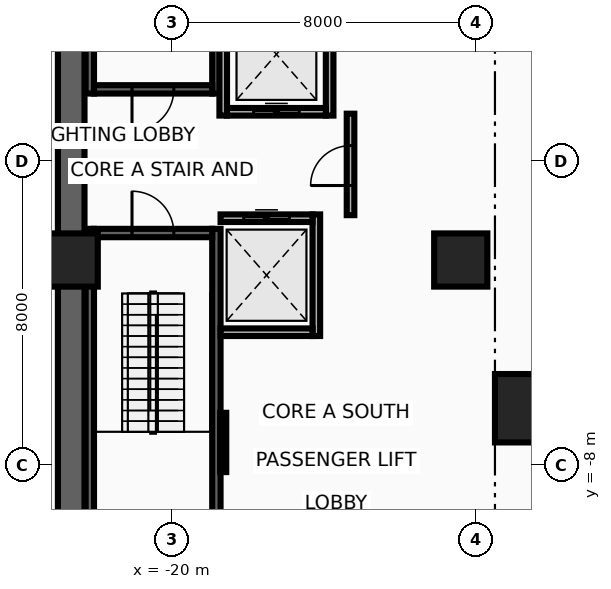
"""IFC4 building model, lengths in metres.
Left out: names, types, materials, properties, quantities, classifications, styles, units other than length and angle.
Written with IfcOpenShell. Run it as: python <this file> out.ifc"""

import sys

from ifc_helpers import new_model, si_unit, direction, frame, frame_2d, origin, origin_2d, place, context, subcontext, project, spatial, rectangle, extrude, source, transform, mapped, element, fill, save


model = new_model("IFC4")
c1 = context("Model", 3, precision=1e-05, world=origin(), true_north=direction((0.0, 1.0)))
c2 = subcontext(c1, "Body", "Model", "MODEL_VIEW")
j1 = project(units=[si_unit("LENGTHUNIT", "METRE"), si_unit("PLANEANGLEUNIT", "RADIAN")], contexts=[c1])
p1 = place(None, origin())
s1 = spatial("IfcSite", under=j1, at=p1, CompositionType="ELEMENT")
p2 = place(p1, origin())
s2 = spatial("IfcBuilding", under=s1, at=p2, CompositionType="ELEMENT")
p3 = place(p2, frame((0.0, 0.0, -9.6)))
s3 = spatial("IfcBuildingStorey", under=s2, at=p3, CompositionType="ELEMENT", Elevation=-9.6)
for number, where, z_axis, x_axis in (
    (1, (-22.16, 1.78, 0.0), (0.0, 0.0, 1.0), (0.0, 1.0, 0.0)),
    (2, (-18.83, 1.78, 0.0), (0.0, 0.0, 1.0), (0.0, 1.0, 0.0)),
):
    element("IfcWall", number, at=place(p3, frame(where, z_axis=z_axis, x_axis=x_axis)), inside=s3, PredefinedType="SHEAR", context=c2, shape_type="SweptSolid", body=[
        extrude(rectangle(XDim=8.67, YDim=0.22, at=frame_2d((4.335, 0.0))), origin(), (0.0, 0.0, 1.0), 4.54),
    ])
p4 = place(p3, frame((-22.05, 1.89, 0.0), z_axis=(0.0, 0.0, 1.0), x_axis=(1.0, 0.0, 0.0)))
e3 = element("IfcWall", 3, at=p4, inside=s3, PredefinedType="SHEAR", context=c2, shape_type="SweptSolid", body=[
    extrude(rectangle(XDim=3.11, YDim=0.22, at=frame_2d((1.555, 0.0))), origin(), (0.0, 0.0, 1.0), 4.54),
])
p5 = place(p4, frame((1.0, 0.0, 0.0)))
e4 = element("IfcOpeningElement", 4, at=p5, cuts=e3, PredefinedType="OPENING", context=c2, shape_type="SweptSolid", body=[
    extrude(rectangle(XDim=1.1, YDim=2.15, at=frame_2d((0.55, 1.075))), frame((0.0, 0.125, 0.0), z_axis=(0.0, -1.0, 0.0), x_axis=(1.0, 0.0, 0.0)), (0.0, 0.0, 1.0), 0.25),
])
for number, where, z_axis, x_axis in (
    (5, (-22.16, -10.45, 0.0), (0.0, 0.0, 1.0), (0.0, 1.0, 0.0)),
    (6, (-18.83, -10.45, 0.0), (0.0, 0.0, 1.0), (0.0, 1.0, 0.0)),
):
    element("IfcWall", number, at=place(p3, frame(where, z_axis=z_axis, x_axis=x_axis)), inside=s3, PredefinedType="SHEAR", context=c2, shape_type="SweptSolid", body=[
        extrude(rectangle(XDim=8.67, YDim=0.22, at=frame_2d((4.335, 0.0))), origin(), (0.0, 0.0, 1.0), 4.54),
    ])
p6 = place(p3, frame((-22.05, -1.89, 0.0), z_axis=(0.0, 0.0, 1.0), x_axis=(1.0, 0.0, 0.0)))
e7 = element("IfcWall", 7, at=p6, inside=s3, PredefinedType="SHEAR", context=c2, shape_type="SweptSolid", body=[
    extrude(rectangle(XDim=3.11, YDim=0.22, at=frame_2d((1.555, 0.0))), origin(), (0.0, 0.0, 1.0), 4.54),
])
p7 = place(p6, frame((1.0, 0.0, 0.0)))
e8 = element("IfcOpeningElement", 8, at=p7, cuts=e7, PredefinedType="OPENING", context=c2, shape_type="SweptSolid", body=[
    extrude(rectangle(XDim=1.1, YDim=2.15, at=frame_2d((0.55, 1.075))), frame((0.0, 0.125, 0.0), z_axis=(0.0, -1.0, 0.0), x_axis=(1.0, 0.0, 0.0)), (0.0, 0.0, 1.0), 0.25),
])
p8 = place(p3, frame((-22.65, -11.15, 0.0), z_axis=(0.0, 0.0, 1.0), x_axis=(0.0, 1.0, 0.0)))
e9 = element("IfcWall", 9, at=p8, inside=s3, PredefinedType="SHEAR", context=c2, shape_type="SweptSolid", body=[
    extrude(rectangle(XDim=22.3, YDim=0.7, at=frame_2d((11.15, 0.0))), origin(), (0.0, 0.0, 1.0), 4.54),
])
m1 = source(origin(), c2, "Body", "SweptSolid", [
    extrude(rectangle(XDim=1.4, YDim=1.4, at=origin_2d()), origin(), (0.0, 0.0, 1.0), 4.8),
])
for number, where, z_axis, x_axis in (
    (10, (-22.65, -2.6, 0.0), (0.0, 0.0, 1.0), (1.0, 0.0, 0.0)),
    (11, (-12.4, -2.6, 0.0), (0.0, 0.0, 1.0), (1.0, 0.0, 0.0)),
):
    element("IfcColumn", number, at=place(p3, frame(where, z_axis=z_axis, x_axis=x_axis)), inside=s3, PredefinedType="COLUMN", context=c2, shape_type="MappedRepresentation", body=[
        mapped(m1, transform((0.0, 0.0, 0.0), x_axis=(1.0, 0.0, 0.0), y_axis=(0.0, 1.0, 0.0), z_axis=(0.0, 0.0, 1.0), scale=1.0)),
    ])
m2 = source(origin(), c2, "Body", "SweptSolid", [
    extrude(rectangle(XDim=1.8, YDim=1.8, at=origin_2d()), origin(), (0.0, 0.0, 1.0), 4.8),
])
p9 = place(p3, frame((-10.6, -6.5, 0.0), z_axis=(0.0, 0.0, 1.0), x_axis=(1.0, 0.0, 0.0)))
e12 = element("IfcColumn", 12, at=p9, inside=s3, PredefinedType="COLUMN", context=c2, shape_type="MappedRepresentation", body=[
    mapped(m2, transform((0.0, 0.0, 0.0), x_axis=(1.0, 0.0, 0.0), y_axis=(0.0, 1.0, 0.0), z_axis=(0.0, 0.0, 1.0), scale=1.0)),
])
for number, where, z_axis, x_axis in (
    (13, (-18.65, 1.2, 0.0), (0.0, 0.0, 1.0), (0.0, 1.0, 0.0)),
    (14, (-15.85, 1.2, 0.0), (0.0, 0.0, 1.0), (0.0, 1.0, 0.0)),
):
    element("IfcWall", number, at=place(p3, frame(where, z_axis=z_axis, x_axis=x_axis)), inside=s3, PredefinedType="MOVABLE", context=c2, shape_type="SweptSolid", body=[
        extrude(rectangle(XDim=3.225, YDim=0.2, at=frame_2d((1.613, 0.0))), origin(), (0.0, 0.0, 1.0), 4.54),
    ])
p10 = place(p3, frame((-18.55, 1.3, 0.0), z_axis=(0.0, 0.0, 1.0), x_axis=(1.0, 0.0, 0.0)))
e15 = element("IfcWall", 15, at=p10, inside=s3, PredefinedType="MOVABLE", context=c2, shape_type="SweptSolid", body=[
    extrude(rectangle(XDim=2.6, YDim=0.2, at=frame_2d((1.3, 0.0))), origin(), (0.0, 0.0, 1.0), 4.54),
])
p11 = place(p10, frame((0.7, 0.0, 0.0)))
e16 = element("IfcOpeningElement", 16, at=p11, cuts=e15, PredefinedType="OPENING", context=c2, shape_type="SweptSolid", body=[
    extrude(rectangle(XDim=1.2, YDim=2.1, at=frame_2d((0.6, 1.05))), frame((0.0, 0.115, 0.0), z_axis=(0.0, -1.0, 0.0), x_axis=(1.0, 0.0, 0.0)), (0.0, 0.0, 1.0), 0.23),
])
p12 = place(p3, frame((-16.2, -4.6, 0.0), z_axis=(0.0, 0.0, 1.0), x_axis=(0.0, 1.0, 0.0)))
e17 = element("IfcWall", 17, at=p12, inside=s3, PredefinedType="MOVABLE", context=c2, shape_type="SweptSolid", body=[
    extrude(rectangle(XDim=3.2, YDim=0.2, at=frame_2d((1.6, 0.0))), origin(), (0.0, 0.0, 1.0), 4.54),
])
p13 = place(p3, frame((-18.72, -4.5, 0.0), z_axis=(0.0, 0.0, 1.0), x_axis=(1.0, 0.0, 0.0)))
e18 = element("IfcWall", 18, at=p13, inside=s3, PredefinedType="MOVABLE", context=c2, shape_type="SweptSolid", body=[
    extrude(rectangle(XDim=2.42, YDim=0.2, at=frame_2d((1.21, 0.0))), origin(), (0.0, 0.0, 1.0), 4.54),
])
p14 = place(p3, frame((-18.72, -1.5, 0.0), z_axis=(0.0, 0.0, 1.0), x_axis=(1.0, 0.0, 0.0)))
e19 = element("IfcWall", 19, at=p14, inside=s3, PredefinedType="MOVABLE", context=c2, shape_type="SweptSolid", body=[
    extrude(rectangle(XDim=2.42, YDim=0.2, at=frame_2d((1.21, 0.0))), origin(), (0.0, 0.0, 1.0), 4.54),
])
p15 = place(p14, frame((0.61, 0.0, 0.0)))
e20 = element("IfcOpeningElement", 20, at=p15, cuts=e19, PredefinedType="OPENING", context=c2, shape_type="SweptSolid", body=[
    extrude(rectangle(XDim=1.2, YDim=2.1, at=frame_2d((0.6, 1.05))), frame((0.0, 0.115, 0.0), z_axis=(0.0, -1.0, 0.0), x_axis=(1.0, 0.0, 0.0)), (0.0, 0.0, 1.0), 0.23),
])
p16 = place(p3, frame((-15.3, -1.42, 0.0), z_axis=(0.0, 0.0, 1.0), x_axis=(0.0, 1.0, 0.0)))
e21 = element("IfcWall", 21, at=p16, inside=s3, PredefinedType="PARTITIONING", context=c2, shape_type="SweptSolid", body=[
    extrude(rectangle(XDim=2.67, YDim=0.2, at=frame_2d((1.335, 0.0))), origin(), (0.0, 0.0, 1.0), 4.54),
])
p17 = place(p16, frame((0.78, 0.0, 0.0)))
e22 = element("IfcOpeningElement", 22, at=p17, cuts=e21, PredefinedType="OPENING", context=c2, shape_type="SweptSolid", body=[
    extrude(rectangle(XDim=1.05, YDim=2.15, at=frame_2d((0.525, 1.075))), frame((0.0, 0.115, 0.0), z_axis=(0.0, -1.0, 0.0), x_axis=(1.0, 0.0, 0.0)), (0.0, 0.0, 1.0), 0.23),
])
p18 = place(p3, frame((-18.65, -8.18, 0.0), z_axis=(0.0, 0.0, 1.0), x_axis=(0.0, 1.0, 0.0)))
e23 = element("IfcWall", 23, at=p18, inside=s3, PredefinedType="PARTITIONING", context=c2, shape_type="SweptSolid", body=[
    extrude(rectangle(XDim=1.56, YDim=0.16, at=frame_2d((0.78, 0.0))), origin(), (0.0, 0.0, 1.0), 4.54),
])
p19 = place(p11, origin())
e24 = element("IfcDoor", 24, at=p19, inside=s3, OperationType="DOUBLE_DOOR_SLIDING", PredefinedType="DOOR", context=c2, shape_type="SweptSolid", body=[
    extrude(rectangle(XDim=1.2, YDim=2.1, at=frame_2d((0.6, 1.05))), frame((0.0, 0.025, 0.0), z_axis=(0.0, -1.0, 0.0), x_axis=(1.0, 0.0, 0.0)), (0.0, 0.0, 1.0), 0.05),
])
fill(e16, e24)
p20 = place(p15, origin())
e25 = element("IfcDoor", 25, at=p20, inside=s3, OperationType="DOUBLE_DOOR_SLIDING", PredefinedType="DOOR", context=c2, shape_type="SweptSolid", body=[
    extrude(rectangle(XDim=1.2, YDim=2.1, at=frame_2d((0.6, 1.05))), frame((0.0, 0.025, 0.0), z_axis=(0.0, -1.0, 0.0), x_axis=(1.0, 0.0, 0.0)), (0.0, 0.0, 1.0), 0.05),
])
fill(e20, e25)
p21 = place(p17, origin())
e26 = element("IfcDoor", 26, at=p21, inside=s3, OperationType="SINGLE_SWING_RIGHT", PredefinedType="DOOR", context=c2, shape_type="SweptSolid", body=[
    extrude(rectangle(XDim=1.05, YDim=2.15, at=frame_2d((0.525, 1.075))), frame((0.0, 0.025, 0.0), z_axis=(0.0, -1.0, 0.0), x_axis=(1.0, 0.0, 0.0)), (0.0, 0.0, 1.0), 0.05),
])
fill(e22, e26)
p22 = place(p5, frame((1.1, 0.0, 0.0), z_axis=(0.0, 0.0, 1.0), x_axis=(-1.0, 0.0, 0.0)))
e27 = element("IfcDoor", 27, at=p22, inside=s3, OperationType="SINGLE_SWING_LEFT", PredefinedType="DOOR", context=c2, shape_type="SweptSolid", body=[
    extrude(rectangle(XDim=1.1, YDim=2.15, at=frame_2d((0.55, 1.075))), frame((0.0, 0.025, 0.0), z_axis=(0.0, -1.0, 0.0), x_axis=(1.0, 0.0, 0.0)), (0.0, 0.0, 1.0), 0.05),
])
fill(e4, e27)
p23 = place(p7, origin())
e28 = element("IfcDoor", 28, at=p23, inside=s3, OperationType="SINGLE_SWING_RIGHT", PredefinedType="DOOR", context=c2, shape_type="SweptSolid", body=[
    extrude(rectangle(XDim=1.1, YDim=2.15, at=frame_2d((0.55, 1.075))), frame((0.0, 0.025, 0.0), z_axis=(0.0, -1.0, 0.0), x_axis=(1.0, 0.0, 0.0)), (0.0, 0.0, 1.0), 0.05),
])
fill(e8, e28)
save(model, sys.argv[1])
